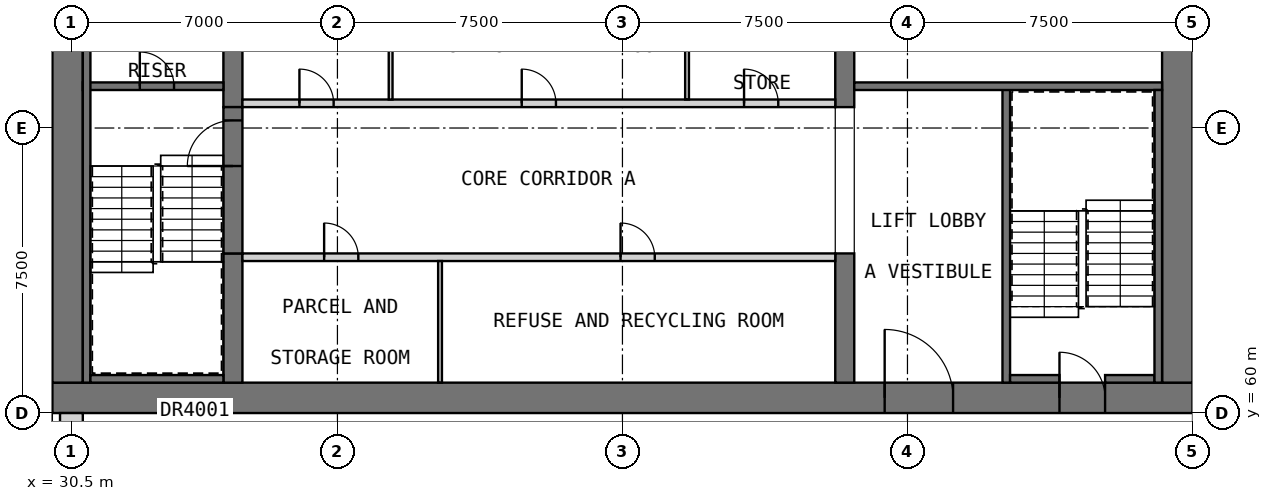
"""IFC4 building model, lengths in metres.
Left out: names, types, materials, properties, quantities, classifications, styles, units other than length and angle.
Written with IfcOpenShell. Run it as: python <this file> out.ifc"""

import sys

from ifc_helpers import new_model, si_unit, direction, frame, frame_2d, origin, place, context, subcontext, project, spatial, rectangle, extrude, element, fill, save


model = new_model("IFC4")
c1 = context("Model", 3, precision=1e-05, world=origin(), true_north=direction((0.0, 1.0)))
c2 = subcontext(c1, "Body", "Model", "MODEL_VIEW")
j1 = project(units=[si_unit("LENGTHUNIT", "METRE"), si_unit("PLANEANGLEUNIT", "RADIAN")], contexts=[c1])
p1 = place(None, origin())
s1 = spatial("IfcSite", under=j1, at=p1, CompositionType="ELEMENT")
p2 = place(p1, origin())
s2 = spatial("IfcBuilding", under=s1, at=p2, CompositionType="ELEMENT")
p3 = place(p2, frame((0.0, 0.0, 189.7)))
s3 = spatial("IfcBuildingStorey", under=s2, at=p3, CompositionType="ELEMENT", Elevation=189.7)
p4 = place(p3, frame((30.0, 60.4, 0.0), z_axis=(0.0, 0.0, 1.0), x_axis=(1.0, 0.0, 0.0)))
e1 = element("IfcWall", 1, at=p4, inside=s3, PredefinedType="SHEAR", context=c2, shape_type="SweptSolid", body=[
    extrude(rectangle(XDim=30.0, YDim=0.8, at=frame_2d((15.0, 0.0))), origin(), (0.0, 0.0, 1.0), 3.5),
])
p5 = place(p4, frame((21.9, 0.0, 0.0)))
e2 = element("IfcOpeningElement", 2, at=p5, cuts=e1, PredefinedType="OPENING", context=c2, shape_type="SweptSolid", body=[
    extrude(rectangle(XDim=1.8, YDim=2.1, at=frame_2d((0.9, 1.05))), frame((0.0, 0.41, 0.0), z_axis=(0.0, -1.0, 0.0), x_axis=(1.0, 0.0, 0.0)), (0.0, 0.0, 1.0), 0.82),
])
p6 = place(p4, frame((26.5, 0.0, 0.0)))
e3 = element("IfcOpeningElement", 3, at=p6, cuts=e1, PredefinedType="OPENING", context=c2, shape_type="SweptSolid", body=[
    extrude(rectangle(XDim=1.2, YDim=2.1, at=frame_2d((0.6, 1.05))), frame((0.0, 0.41, 0.0), z_axis=(0.0, -1.0, 0.0), x_axis=(1.0, 0.0, 0.0)), (0.0, 0.0, 1.0), 0.82),
])
p7 = place(p3, frame((30.4, 60.8, 0.0), z_axis=(0.0, 0.0, 1.0), x_axis=(0.0, 1.0, 0.0)))
e4 = element("IfcWall", 4, at=p7, inside=s3, PredefinedType="SHEAR", context=c2, shape_type="SweptSolid", body=[
    extrude(rectangle(XDim=20.9, YDim=0.8, at=frame_2d((10.45, 0.0))), origin(), (0.0, 0.0, 1.0), 3.5),
])
p8 = place(p3, frame((59.6, 60.8, 0.0), z_axis=(0.0, 0.0, 1.0), x_axis=(0.0, 1.0, 0.0)))
e5 = element("IfcWall", 5, at=p8, inside=s3, PredefinedType="SHEAR", context=c2, shape_type="SweptSolid", body=[
    extrude(rectangle(XDim=20.9, YDim=0.8, at=frame_2d((10.45, 0.0))), origin(), (0.0, 0.0, 1.0), 3.5),
])
p9 = place(p8, frame((14.7, 0.0, 0.0)))
e6 = element("IfcOpeningElement", 6, at=p9, cuts=e5, PredefinedType="OPENING", context=c2, shape_type="SweptSolid", body=[
    extrude(rectangle(XDim=1.8, YDim=2.1, at=frame_2d((0.9, 1.05))), frame((0.0, 0.41, 0.0), z_axis=(0.0, -1.0, 0.0), x_axis=(1.0, 0.0, 0.0)), (0.0, 0.0, 1.0), 0.82),
])
p10 = place(p3, frame((34.75, 60.8, 0.0), z_axis=(0.0, 0.0, 1.0), x_axis=(0.0, 1.0, 0.0)))
e7 = element("IfcWall", 7, at=p10, inside=s3, PredefinedType="SHEAR", context=c2, shape_type="SweptSolid", body=[
    extrude(rectangle(XDim=3.4, YDim=0.5, at=frame_2d((1.7, 0.0))), origin(), (0.0, 0.0, 1.0), 3.5),
])
p11 = place(p3, frame((34.75, 68.05, 0.0), z_axis=(0.0, 0.0, 1.0), x_axis=(0.0, 1.0, 0.0)))
e8 = element("IfcWall", 8, at=p11, inside=s3, PredefinedType="SHEAR", context=c2, shape_type="SweptSolid", body=[
    extrude(rectangle(XDim=6.4, YDim=0.5, at=frame_2d((3.2, 0.0))), origin(), (0.0, 0.0, 1.0), 3.5),
])
p12 = place(p3, frame((50.85, 60.8, 0.0), z_axis=(0.0, 0.0, 1.0), x_axis=(0.0, 1.0, 0.0)))
e9 = element("IfcWall", 9, at=p12, inside=s3, PredefinedType="SHEAR", context=c2, shape_type="SweptSolid", body=[
    extrude(rectangle(XDim=3.4, YDim=0.5, at=frame_2d((1.7, 0.0))), origin(), (0.0, 0.0, 1.0), 3.5),
])
p13 = place(p3, frame((50.85, 68.05, 0.0), z_axis=(0.0, 0.0, 1.0), x_axis=(0.0, 1.0, 0.0)))
e10 = element("IfcWall", 10, at=p13, inside=s3, PredefinedType="SHEAR", context=c2, shape_type="SweptSolid", body=[
    extrude(rectangle(XDim=6.4, YDim=0.5, at=frame_2d((3.2, 0.0))), origin(), (0.0, 0.0, 1.0), 3.5),
])
p14 = place(p3, frame((30.5, 60.0, 0.0), z_axis=(0.0, 0.0, 1.0), x_axis=(0.0, -1.0, 0.0)))
e11 = element("IfcWall", 11, at=p14, inside=s3, PredefinedType="SOLIDWALL", context=c2, shape_type="SweptSolid", body=[
    extrude(rectangle(XDim=7.0, YDim=0.6, at=frame_2d((3.5, 0.0))), origin(), (0.0, 0.0, 1.0), 3.25),
])
p15 = place(p14, frame((4.175, 0.0, 0.8)))
e12 = element("IfcOpeningElement", 12, at=p15, cuts=e11, PredefinedType="OPENING", context=c2, shape_type="SweptSolid", body=[
    extrude(rectangle(XDim=2.4, YDim=1.8, at=frame_2d((1.2, 0.9))), frame((0.0, 0.31, 0.0), z_axis=(0.0, -1.0, 0.0), x_axis=(1.0, 0.0, 0.0)), (0.0, 0.0, 1.0), 0.62),
])
p16 = place(p14, frame((0.675, 0.0, 0.8)))
e13 = element("IfcOpeningElement", 13, at=p16, cuts=e11, PredefinedType="OPENING", context=c2, shape_type="SweptSolid", body=[
    extrude(rectangle(XDim=2.4, YDim=1.8, at=frame_2d((1.2, 0.9))), frame((0.0, 0.31, 0.0), z_axis=(0.0, -1.0, 0.0), x_axis=(1.0, 0.0, 0.0)), (0.0, 0.0, 1.0), 0.62),
])
p17 = place(p3, frame((35.0, 64.1, 0.0), z_axis=(0.0, 0.0, 1.0), x_axis=(1.0, 0.0, 0.0)))
e14 = element("IfcWall", 14, at=p17, inside=s3, PredefinedType="PARTITIONING", context=c2, shape_type="SweptSolid", body=[
    extrude(rectangle(XDim=15.6, YDim=0.2, at=frame_2d((7.8, 0.0))), origin(), (0.0, 0.0, 1.0), 3.25),
])
p18 = place(p17, frame((2.15, 0.0, 0.0)))
e15 = element("IfcOpeningElement", 15, at=p18, cuts=e14, PredefinedType="OPENING", context=c2, shape_type="SweptSolid", body=[
    extrude(rectangle(XDim=0.9, YDim=2.1, at=frame_2d((0.45, 1.05))), frame((0.0, 0.11, 0.0), z_axis=(0.0, -1.0, 0.0), x_axis=(1.0, 0.0, 0.0)), (0.0, 0.0, 1.0), 0.22),
])
p19 = place(p17, frame((9.95, 0.0, 0.0)))
e16 = element("IfcOpeningElement", 16, at=p19, cuts=e14, PredefinedType="OPENING", context=c2, shape_type="SweptSolid", body=[
    extrude(rectangle(XDim=0.9, YDim=2.1, at=frame_2d((0.45, 1.05))), frame((0.0, 0.11, 0.0), z_axis=(0.0, -1.0, 0.0), x_axis=(1.0, 0.0, 0.0)), (0.0, 0.0, 1.0), 0.22),
])
p20 = place(p3, frame((40.2, 60.8, 0.0), z_axis=(0.0, 0.0, 1.0), x_axis=(0.0, 1.0, 0.0)))
e17 = element("IfcWall", 17, at=p20, inside=s3, PredefinedType="PARTITIONING", context=c2, shape_type="SweptSolid", body=[
    extrude(rectangle(XDim=3.2, YDim=0.1, at=frame_2d((1.6, 0.0))), origin(), (0.0, 0.0, 1.0), 3.25),
])
p21 = place(p3, frame((35.0, 68.15, 0.0), z_axis=(0.0, 0.0, 1.0), x_axis=(1.0, 0.0, 0.0)))
e18 = element("IfcWall", 18, at=p21, inside=s3, PredefinedType="PARTITIONING", context=c2, shape_type="SweptSolid", body=[
    extrude(rectangle(XDim=15.6, YDim=0.2, at=frame_2d((7.8, 0.0))), origin(), (0.0, 0.0, 1.0), 3.25),
])
p22 = place(p21, frame((1.5, 0.0, 0.0)))
e19 = element("IfcOpeningElement", 19, at=p22, cuts=e18, PredefinedType="OPENING", context=c2, shape_type="SweptSolid", body=[
    extrude(rectangle(XDim=0.9, YDim=2.1, at=frame_2d((0.45, 1.05))), frame((0.0, 0.11, 0.0), z_axis=(0.0, -1.0, 0.0), x_axis=(1.0, 0.0, 0.0)), (0.0, 0.0, 1.0), 0.22),
])
p23 = place(p21, frame((7.35, 0.0, 0.0)))
e20 = element("IfcOpeningElement", 20, at=p23, cuts=e18, PredefinedType="OPENING", context=c2, shape_type="SweptSolid", body=[
    extrude(rectangle(XDim=0.9, YDim=2.1, at=frame_2d((0.45, 1.05))), frame((0.0, 0.11, 0.0), z_axis=(0.0, -1.0, 0.0), x_axis=(1.0, 0.0, 0.0)), (0.0, 0.0, 1.0), 0.22),
])
p24 = place(p21, frame((13.2, 0.0, 0.0)))
e21 = element("IfcOpeningElement", 21, at=p24, cuts=e18, PredefinedType="OPENING", context=c2, shape_type="SweptSolid", body=[
    extrude(rectangle(XDim=0.9, YDim=2.1, at=frame_2d((0.45, 1.05))), frame((0.0, 0.11, 0.0), z_axis=(0.0, -1.0, 0.0), x_axis=(1.0, 0.0, 0.0)), (0.0, 0.0, 1.0), 0.22),
])
for number, where, z_axis, x_axis in (
    (22, (38.9, 68.25, 0.0), (0.0, 0.0, 1.0), (0.0, 1.0, 0.0)),
    (23, (46.7, 68.25, 0.0), (0.0, 0.0, 1.0), (0.0, 1.0, 0.0)),
):
    element("IfcWall", number, at=place(p3, frame(where, z_axis=z_axis, x_axis=x_axis)), inside=s3, PredefinedType="PARTITIONING", context=c2, shape_type="SweptSolid", body=[
        extrude(rectangle(XDim=2.75, YDim=0.1, at=frame_2d((1.375, 0.0))), origin(), (0.0, 0.0, 1.0), 3.25),
    ])
p25 = place(p3, frame((34.75, 64.2, 0.0), z_axis=(0.0, 0.0, 1.0), x_axis=(0.0, 1.0, 0.0)))
e24 = element("IfcWall", 24, at=p25, inside=s3, PredefinedType="SOLIDWALL", context=c2, shape_type="SweptSolid", body=[
    extrude(rectangle(XDim=3.85, YDim=0.5, at=frame_2d((1.925, 0.0))), origin(), (0.0, 0.0, 1.0), 2.3),
])
p26 = place(p25, frame((2.3, 0.0, 0.0)))
e25 = element("IfcOpeningElement", 25, at=p26, cuts=e24, PredefinedType="OPENING", context=c2, shape_type="SweptSolid", body=[
    extrude(rectangle(XDim=1.2, YDim=2.1, at=frame_2d((0.6, 1.05))), frame((0.0, 0.26, 0.0), z_axis=(0.0, -1.0, 0.0), x_axis=(1.0, 0.0, 0.0)), (0.0, 0.0, 1.0), 0.52),
])
p27 = place(p3, frame((30.8, 68.6, 0.0), z_axis=(0.0, 0.0, 1.0), x_axis=(1.0, 0.0, 0.0)))
e26 = element("IfcWall", 26, at=p27, inside=s3, PredefinedType="SOLIDWALL", context=c2, shape_type="SweptSolid", body=[
    extrude(rectangle(XDim=3.7, YDim=0.2, at=frame_2d((1.85, 0.0))), origin(), (0.0, 0.0, 1.0), 3.25),
])
p28 = place(p27, frame((1.5, 0.0, 0.0)))
e27 = element("IfcOpeningElement", 27, at=p28, cuts=e26, PredefinedType="OPENING", context=c2, shape_type="SweptSolid", body=[
    extrude(rectangle(XDim=0.9, YDim=2.1, at=frame_2d((0.45, 1.05))), frame((0.0, 0.11, 0.0), z_axis=(0.0, -1.0, 0.0), x_axis=(1.0, 0.0, 0.0)), (0.0, 0.0, 1.0), 0.22),
])
p29 = place(p3, frame((55.1, 60.8, 0.0), z_axis=(0.0, 0.0, 1.0), x_axis=(0.0, 1.0, 0.0)))
e28 = element("IfcWall", 28, at=p29, inside=s3, PredefinedType="SOLIDWALL", context=c2, shape_type="SweptSolid", body=[
    extrude(rectangle(XDim=7.8, YDim=0.2, at=frame_2d((3.9, 0.0))), origin(), (0.0, 0.0, 1.0), 3.25),
])
p30 = place(p3, frame((51.1, 68.6, 0.0), z_axis=(0.0, 0.0, 1.0), x_axis=(1.0, 0.0, 0.0)))
e29 = element("IfcWall", 29, at=p30, inside=s3, PredefinedType="SOLIDWALL", context=c2, shape_type="SweptSolid", body=[
    extrude(rectangle(XDim=8.1, YDim=0.2, at=frame_2d((4.05, 0.0))), origin(), (0.0, 0.0, 1.0), 3.25),
])
p31 = place(p3, frame((30.9, 60.8, 0.0), z_axis=(0.0, 0.0, 1.0), x_axis=(0.0, 1.0, 0.0)))
e30 = element("IfcWall", 30, at=p31, inside=s3, PredefinedType="SOLIDWALL", context=c2, shape_type="SweptSolid", body=[
    extrude(rectangle(XDim=20.9, YDim=0.2, at=frame_2d((10.45, 0.0))), origin(), (0.0, 0.0, 1.0), 3.25),
])
p32 = place(p3, frame((31.0, 60.9, 0.0), z_axis=(0.0, 0.0, 1.0), x_axis=(1.0, 0.0, 0.0)))
e31 = element("IfcWall", 31, at=p32, inside=s3, PredefinedType="SOLIDWALL", context=c2, shape_type="SweptSolid", body=[
    extrude(rectangle(XDim=3.5, YDim=0.2, at=frame_2d((1.75, 0.0))), origin(), (0.0, 0.0, 1.0), 3.25),
])
for number, where, z_axis, x_axis in (
    (32, (55.2, 60.9, 0.0), (0.0, 0.0, 1.0), (1.0, 0.0, 0.0)),
    (33, (57.7, 60.9, 0.0), (0.0, 0.0, 1.0), (1.0, 0.0, 0.0)),
):
    element("IfcWall", number, at=place(p3, frame(where, z_axis=z_axis, x_axis=x_axis)), inside=s3, PredefinedType="SOLIDWALL", context=c2, shape_type="SweptSolid", body=[
        extrude(rectangle(XDim=1.3, YDim=0.2, at=frame_2d((0.65, 0.0))), origin(), (0.0, 0.0, 1.0), 3.25),
    ])
p33 = place(p3, frame((59.1, 60.8, 0.0), z_axis=(0.0, 0.0, 1.0), x_axis=(0.0, 1.0, 0.0)))
e34 = element("IfcWall", 34, at=p33, inside=s3, PredefinedType="SOLIDWALL", context=c2, shape_type="SweptSolid", body=[
    extrude(rectangle(XDim=7.7, YDim=0.2, at=frame_2d((3.85, 0.0))), origin(), (0.0, 0.0, 1.0), 3.25),
])
p34 = place(p3, frame((33.75, 57.975, 0.0), z_axis=(0.0, 0.0, 1.0), x_axis=(0.0, 1.0, 0.0)))
e35 = element("IfcWall", 35, at=p34, inside=s3, PredefinedType="PARTITIONING", context=c2, shape_type="SweptSolid", body=[
    extrude(rectangle(XDim=2.025, YDim=0.15, at=frame_2d((1.012, 0.0))), origin(), (0.0, 0.0, 1.0), 3.25),
])
p35 = place(p34, frame((0.475, 0.0, 0.0)))
e36 = element("IfcOpeningElement", 36, at=p35, cuts=e35, PredefinedType="OPENING", context=c2, shape_type="SweptSolid", body=[
    extrude(rectangle(XDim=1.0, YDim=2.1, at=frame_2d((0.5, 1.05))), frame((0.0, 0.085, 0.0), z_axis=(0.0, -1.0, 0.0), x_axis=(1.0, 0.0, 0.0)), (0.0, 0.0, 1.0), 0.17),
])
p36 = place(p18, origin())
e37 = element("IfcDoor", 37, at=p36, inside=s3, OperationType="SINGLE_SWING_RIGHT", PredefinedType="DOOR", context=c2, shape_type="SweptSolid", body=[
    extrude(rectangle(XDim=0.9, YDim=2.1, at=frame_2d((0.45, 1.05))), frame((0.0, 0.025, 0.0), z_axis=(0.0, -1.0, 0.0), x_axis=(1.0, 0.0, 0.0)), (0.0, 0.0, 1.0), 0.05),
])
fill(e15, e37)
p37 = place(p19, origin())
e38 = element("IfcDoor", 38, at=p37, inside=s3, OperationType="SINGLE_SWING_LEFT", PredefinedType="DOOR", context=c2, shape_type="SweptSolid", body=[
    extrude(rectangle(XDim=0.9, YDim=2.1, at=frame_2d((0.45, 1.05))), frame((0.0, 0.025, 0.0), z_axis=(0.0, -1.0, 0.0), x_axis=(1.0, 0.0, 0.0)), (0.0, 0.0, 1.0), 0.05),
])
fill(e16, e38)
p38 = place(p22, origin())
e39 = element("IfcDoor", 39, at=p38, inside=s3, OperationType="SINGLE_SWING_RIGHT", PredefinedType="DOOR", context=c2, shape_type="SweptSolid", body=[
    extrude(rectangle(XDim=0.9, YDim=2.1, at=frame_2d((0.45, 1.05))), frame((0.0, 0.025, 0.0), z_axis=(0.0, -1.0, 0.0), x_axis=(1.0, 0.0, 0.0)), (0.0, 0.0, 1.0), 0.05),
])
fill(e19, e39)
p39 = place(p23, origin())
e40 = element("IfcDoor", 40, at=p39, inside=s3, OperationType="SINGLE_SWING_LEFT", PredefinedType="DOOR", context=c2, shape_type="SweptSolid", body=[
    extrude(rectangle(XDim=0.9, YDim=2.1, at=frame_2d((0.45, 1.05))), frame((0.0, 0.025, 0.0), z_axis=(0.0, -1.0, 0.0), x_axis=(1.0, 0.0, 0.0)), (0.0, 0.0, 1.0), 0.05),
])
fill(e20, e40)
p40 = place(p24, origin())
e41 = element("IfcDoor", 41, at=p40, inside=s3, OperationType="SINGLE_SWING_RIGHT", PredefinedType="DOOR", context=c2, shape_type="SweptSolid", body=[
    extrude(rectangle(XDim=0.9, YDim=2.1, at=frame_2d((0.45, 1.05))), frame((0.0, 0.025, 0.0), z_axis=(0.0, -1.0, 0.0), x_axis=(1.0, 0.0, 0.0)), (0.0, 0.0, 1.0), 0.05),
])
fill(e21, e41)
p41 = place(p5, origin())
e42 = element("IfcDoor", 42, at=p41, inside=s3, OperationType="DOUBLE_DOOR_SINGLE_SWING", PredefinedType="DOOR", context=c2, shape_type="SweptSolid", body=[
    extrude(rectangle(XDim=1.8, YDim=2.1, at=frame_2d((0.9, 1.05))), frame((0.0, 0.025, 0.0), z_axis=(0.0, -1.0, 0.0), x_axis=(1.0, 0.0, 0.0)), (0.0, 0.0, 1.0), 0.05),
])
fill(e2, e42)
p42 = place(p26, origin())
e43 = element("IfcDoor", 43, at=p42, inside=s3, OperationType="SINGLE_SWING_LEFT", PredefinedType="DOOR", context=c2, shape_type="SweptSolid", body=[
    extrude(rectangle(XDim=1.2, YDim=2.1, at=frame_2d((0.6, 1.05))), frame((0.0, 0.025, 0.0), z_axis=(0.0, -1.0, 0.0), x_axis=(1.0, 0.0, 0.0)), (0.0, 0.0, 1.0), 0.05),
])
fill(e25, e43)
p43 = place(p28, origin())
e44 = element("IfcDoor", 44, at=p43, inside=s3, OperationType="SINGLE_SWING_LEFT", PredefinedType="DOOR", context=c2, shape_type="SweptSolid", body=[
    extrude(rectangle(XDim=0.9, YDim=2.1, at=frame_2d((0.45, 1.05))), frame((0.0, 0.025, 0.0), z_axis=(0.0, -1.0, 0.0), x_axis=(1.0, 0.0, 0.0)), (0.0, 0.0, 1.0), 0.05),
])
fill(e27, e44)
p44 = place(p6, origin())
e45 = element("IfcDoor", 45, at=p44, inside=s3, OperationType="SINGLE_SWING_LEFT", PredefinedType="DOOR", context=c2, shape_type="SweptSolid", body=[
    extrude(rectangle(XDim=1.2, YDim=2.1, at=frame_2d((0.6, 1.05))), frame((0.0, 0.025, 0.0), z_axis=(0.0, -1.0, 0.0), x_axis=(1.0, 0.0, 0.0)), (0.0, 0.0, 1.0), 0.05),
])
fill(e3, e45)
save(model, sys.argv[1])
